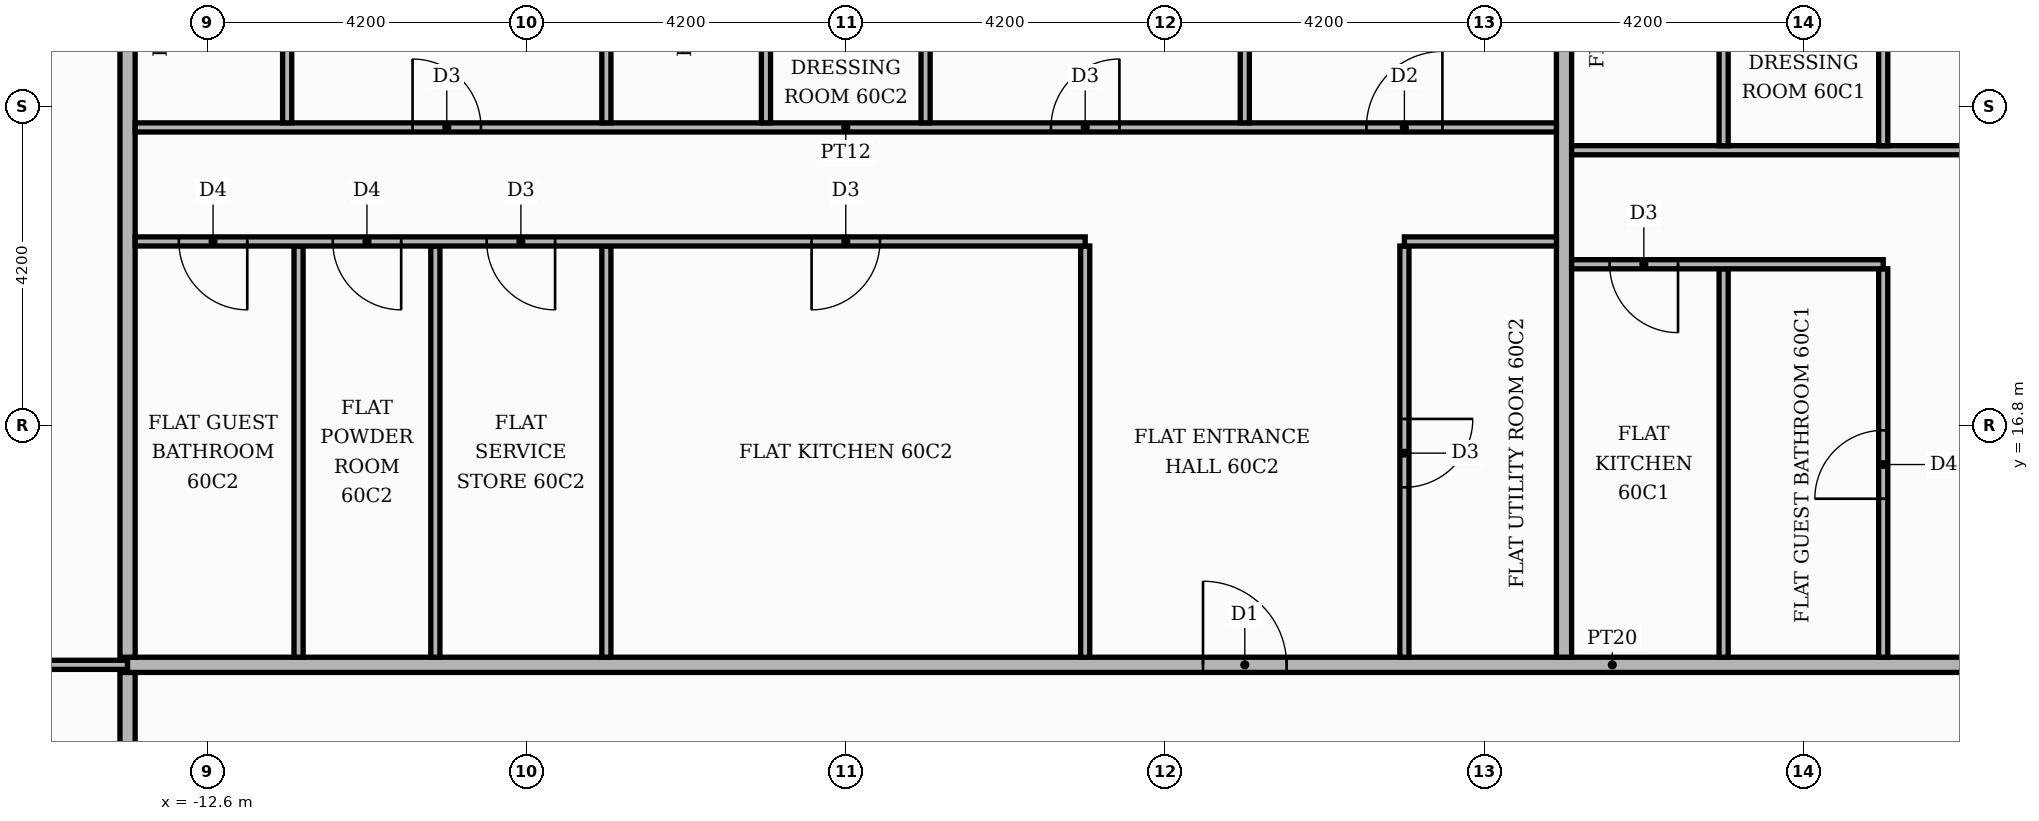
"""IFC4 building model, lengths in metres.
Left out: names, types, materials, properties, quantities, classifications, styles, units other than length and angle.
Written with IfcOpenShell. Run it as: python <this file> out.ifc"""

import sys

from ifc_helpers import new_model, si_unit, direction, frame, frame_2d, origin, place, context, subcontext, project, spatial, rectangle, extrude, element, fill, save


model = new_model("IFC4")
c1 = context("Model", 3, precision=1e-05, world=origin(), true_north=direction((0.0, 1.0)))
c2 = subcontext(c1, "Body", "Model", "MODEL_VIEW")
j1 = project(units=[si_unit("LENGTHUNIT", "METRE"), si_unit("PLANEANGLEUNIT", "RADIAN")], contexts=[c1])
p1 = place(None, origin())
s1 = spatial("IfcSite", under=j1, at=p1, CompositionType="ELEMENT")
p2 = place(p1, origin())
s2 = spatial("IfcBuilding", under=s1, at=p2, CompositionType="ELEMENT")
p3 = place(p2, frame((0.0, 0.0, 252.3)))
s3 = spatial("IfcBuildingStorey", under=s2, at=p3, CompositionType="ELEMENT", Elevation=252.3)
p4 = place(p3, frame((-13.65, 11.1, 0.0), z_axis=(0.0, 0.0, 1.0), x_axis=(0.0, 1.0, 0.0)))
e1 = element("IfcWall", 1, at=p4, inside=s3, PredefinedType="PARTITIONING", context=c2, shape_type="SweptSolid", body=[
    extrude(rectangle(XDim=2.45, YDim=0.2, at=frame_2d((1.225, 0.0))), origin(), (0.0, 0.0, 1.0), 3.48),
])
p5 = place(p3, frame((-20.12, 13.65, 0.0), z_axis=(0.0, 0.0, 1.0), x_axis=(1.0, 0.0, 0.0)))
e2 = element("IfcWall", 2, at=p5, inside=s3, PredefinedType="PARTITIONING", context=c2, shape_type="SweptSolid", body=[
    extrude(rectangle(XDim=6.47, YDim=0.12, at=frame_2d((3.235, 0.0))), origin(), (0.0, 0.0, 1.0), 3.48),
])
p6 = place(p5, frame((2.785, 0.0, 0.0)))
e3 = element("IfcOpeningElement", 3, at=p6, cuts=e2, PredefinedType="OPENING", context=c2, shape_type="SweptSolid", body=[
    extrude(rectangle(XDim=0.9, YDim=2.1, at=frame_2d((0.45, 1.05))), frame((0.0, 0.07, 0.0), z_axis=(0.0, -1.0, 0.0), x_axis=(1.0, 0.0, 0.0)), (0.0, 0.0, 1.0), 0.14),
])
p7 = place(p3, frame((-13.65, 13.65, 0.0), z_axis=(0.0, 0.0, 1.0), x_axis=(1.0, 0.0, 0.0)))
e4 = element("IfcWall", 4, at=p7, inside=s3, PredefinedType="PARTITIONING", context=c2, shape_type="SweptSolid", body=[
    extrude(rectangle(XDim=39.07, YDim=0.2, at=frame_2d((19.535, 0.0))), origin(), (0.0, 0.0, 1.0), 3.48),
])
p8 = place(p7, frame((24.65, 0.0, 0.0)))
e5 = element("IfcOpeningElement", 5, at=p8, cuts=e4, PredefinedType="OPENING", context=c2, shape_type="SweptSolid", body=[
    extrude(rectangle(XDim=1.1, YDim=2.4, at=frame_2d((0.55, 1.2))), frame((0.0, 0.11, 0.0), z_axis=(0.0, -1.0, 0.0), x_axis=(1.0, 0.0, 0.0)), (0.0, 0.0, 1.0), 0.22),
])
p9 = place(p7, frame((14.15, 0.0, 0.0)))
e6 = element("IfcOpeningElement", 6, at=p9, cuts=e4, PredefinedType="OPENING", context=c2, shape_type="SweptSolid", body=[
    extrude(rectangle(XDim=1.1, YDim=2.4, at=frame_2d((0.55, 1.2))), frame((0.0, 0.11, 0.0), z_axis=(0.0, -1.0, 0.0), x_axis=(1.0, 0.0, 0.0)), (0.0, 0.0, 1.0), 0.22),
])
p10 = place(p3, frame((-13.65, 13.75, 0.0), z_axis=(0.0, 0.0, 1.0), x_axis=(0.0, 1.0, 0.0)))
e7 = element("IfcWall", 7, at=p10, inside=s3, PredefinedType="PARTITIONING", context=c2, shape_type="SweptSolid", body=[
    extrude(rectangle(XDim=11.67, YDim=0.2, at=frame_2d((5.835, 0.0))), origin(), (0.0, 0.0, 1.0), 3.48),
])
for number, where, z_axis, x_axis in (
    (8, (-11.4, 13.75, 0.0), (0.0, 0.0, 1.0), (0.0, 1.0, 0.0)),
    (9, (-9.6, 13.75, 0.0), (0.0, 0.0, 1.0), (0.0, 1.0, 0.0)),
    (10, (-7.35, 13.75, 0.0), (0.0, 0.0, 1.0), (0.0, 1.0, 0.0)),
    (11, (-1.05, 13.75, 0.0), (0.0, 0.0, 1.0), (0.0, 1.0, 0.0)),
):
    element("IfcWall", number, at=place(p3, frame(where, z_axis=z_axis, x_axis=x_axis)), inside=s3, PredefinedType="PARTITIONING", context=c2, shape_type="SweptSolid", body=[
        extrude(rectangle(XDim=5.41, YDim=0.12, at=frame_2d((2.705, 0.0))), origin(), (0.0, 0.0, 1.0), 3.48),
    ])
p11 = place(p3, frame((3.15, 13.75, 0.0), z_axis=(0.0, 0.0, 1.0), x_axis=(0.0, 1.0, 0.0)))
e12 = element("IfcWall", 12, at=p11, inside=s3, PredefinedType="PARTITIONING", context=c2, shape_type="SweptSolid", body=[
    extrude(rectangle(XDim=5.41, YDim=0.12, at=frame_2d((2.705, 0.0))), origin(), (0.0, 0.0, 1.0), 3.48),
])
p12 = place(p11, frame((2.235, 0.0, 0.0)))
e13 = element("IfcOpeningElement", 13, at=p12, cuts=e12, PredefinedType="OPENING", context=c2, shape_type="SweptSolid", body=[
    extrude(rectangle(XDim=0.9, YDim=2.1, at=frame_2d((0.45, 1.05))), frame((0.0, 0.07, 0.0), z_axis=(0.0, -1.0, 0.0), x_axis=(1.0, 0.0, 0.0)), (0.0, 0.0, 1.0), 0.14),
])
p13 = place(p3, frame((5.25, 13.75, 0.0), z_axis=(0.0, 0.0, 1.0), x_axis=(0.0, 1.0, 0.0)))
e14 = element("IfcWall", 14, at=p13, inside=s3, PredefinedType="PARTITIONING", context=c2, shape_type="SweptSolid", body=[
    extrude(rectangle(XDim=11.67, YDim=0.2, at=frame_2d((5.835, 0.0))), origin(), (0.0, 0.0, 1.0), 3.48),
])
p14 = place(p3, frame((7.35, 13.75, 0.0), z_axis=(0.0, 0.0, 1.0), x_axis=(0.0, 1.0, 0.0)))
e15 = element("IfcWall", 15, at=p14, inside=s3, PredefinedType="PARTITIONING", context=c2, shape_type="SweptSolid", body=[
    extrude(rectangle(XDim=5.11, YDim=0.12, at=frame_2d((2.555, 0.0))), origin(), (0.0, 0.0, 1.0), 3.48),
])
p15 = place(p3, frame((9.45, 13.75, 0.0), z_axis=(0.0, 0.0, 1.0), x_axis=(0.0, 1.0, 0.0)))
e16 = element("IfcWall", 16, at=p15, inside=s3, PredefinedType="PARTITIONING", context=c2, shape_type="SweptSolid", body=[
    extrude(rectangle(XDim=5.11, YDim=0.12, at=frame_2d((2.555, 0.0))), origin(), (0.0, 0.0, 1.0), 3.48),
])
p16 = place(p15, frame((2.085, 0.0, 0.0)))
e17 = element("IfcOpeningElement", 17, at=p16, cuts=e16, PredefinedType="OPENING", context=c2, shape_type="SweptSolid", body=[
    extrude(rectangle(XDim=0.9, YDim=2.1, at=frame_2d((0.45, 1.05))), frame((0.0, 0.07, 0.0), z_axis=(0.0, -1.0, 0.0), x_axis=(1.0, 0.0, 0.0)), (0.0, 0.0, 1.0), 0.14),
])
p17 = place(p3, frame((5.35, 18.92, 0.0), z_axis=(0.0, 0.0, 1.0), x_axis=(1.0, 0.0, 0.0)))
e18 = element("IfcWall", 18, at=p17, inside=s3, PredefinedType="PARTITIONING", context=c2, shape_type="SweptSolid", body=[
    extrude(rectangle(XDim=4.1, YDim=0.12, at=frame_2d((2.05, 0.0))), origin(), (0.0, 0.0, 1.0), 3.48),
])
p18 = place(p17, frame((0.5, 0.0, 0.0)))
e19 = element("IfcOpeningElement", 19, at=p18, cuts=e18, PredefinedType="OPENING", context=c2, shape_type="SweptSolid", body=[
    extrude(rectangle(XDim=0.9, YDim=2.1, at=frame_2d((0.45, 1.05))), frame((0.0, 0.07, 0.0), z_axis=(0.0, -1.0, 0.0), x_axis=(1.0, 0.0, 0.0)), (0.0, 0.0, 1.0), 0.14),
])
p19 = place(p3, frame((-13.55, 19.22, 0.0), z_axis=(0.0, 0.0, 1.0), x_axis=(1.0, 0.0, 0.0)))
e20 = element("IfcWall", 20, at=p19, inside=s3, PredefinedType="PARTITIONING", context=c2, shape_type="SweptSolid", body=[
    extrude(rectangle(XDim=12.5, YDim=0.12, at=frame_2d((6.25, 0.0))), origin(), (0.0, 0.0, 1.0), 3.48),
])
p20 = place(p19, frame((8.9, 0.0, 0.0)))
e21 = element("IfcOpeningElement", 21, at=p20, cuts=e20, PredefinedType="OPENING", context=c2, shape_type="SweptSolid", body=[
    extrude(rectangle(XDim=0.9, YDim=2.1, at=frame_2d((0.45, 1.05))), frame((0.0, 0.07, 0.0), z_axis=(0.0, -1.0, 0.0), x_axis=(1.0, 0.0, 0.0)), (0.0, 0.0, 1.0), 0.14),
])
p21 = place(p19, frame((4.625, 0.0, 0.0)))
e22 = element("IfcOpeningElement", 22, at=p21, cuts=e20, PredefinedType="OPENING", context=c2, shape_type="SweptSolid", body=[
    extrude(rectangle(XDim=0.9, YDim=2.1, at=frame_2d((0.45, 1.05))), frame((0.0, 0.07, 0.0), z_axis=(0.0, -1.0, 0.0), x_axis=(1.0, 0.0, 0.0)), (0.0, 0.0, 1.0), 0.14),
])
p22 = place(p19, frame((2.6, 0.0, 0.0)))
e23 = element("IfcOpeningElement", 23, at=p22, cuts=e20, PredefinedType="OPENING", context=c2, shape_type="SweptSolid", body=[
    extrude(rectangle(XDim=0.9, YDim=2.1, at=frame_2d((0.45, 1.05))), frame((0.0, 0.07, 0.0), z_axis=(0.0, -1.0, 0.0), x_axis=(1.0, 0.0, 0.0)), (0.0, 0.0, 1.0), 0.14),
])
p23 = place(p19, frame((0.575, 0.0, 0.0)))
e24 = element("IfcOpeningElement", 24, at=p23, cuts=e20, PredefinedType="OPENING", context=c2, shape_type="SweptSolid", body=[
    extrude(rectangle(XDim=0.9, YDim=2.1, at=frame_2d((0.45, 1.05))), frame((0.0, 0.07, 0.0), z_axis=(0.0, -1.0, 0.0), x_axis=(1.0, 0.0, 0.0)), (0.0, 0.0, 1.0), 0.14),
])
p24 = place(p3, frame((3.15, 19.22, 0.0), z_axis=(0.0, 0.0, 1.0), x_axis=(1.0, 0.0, 0.0)))
e25 = element("IfcWall", 25, at=p24, inside=s3, PredefinedType="PARTITIONING", context=c2, shape_type="SweptSolid", body=[
    extrude(rectangle(XDim=2.0, YDim=0.12, at=frame_2d((1.0, 0.0))), origin(), (0.0, 0.0, 1.0), 3.48),
])
p25 = place(p3, frame((5.35, 20.42, 0.0), z_axis=(0.0, 0.0, 1.0), x_axis=(1.0, 0.0, 0.0)))
e26 = element("IfcWall", 26, at=p25, inside=s3, PredefinedType="PARTITIONING", context=c2, shape_type="SweptSolid", body=[
    extrude(rectangle(XDim=15.369, YDim=0.12, at=frame_2d((7.685, 0.0))), origin(), (0.0, 0.0, 1.0), 3.48),
])
p26 = place(p25, frame((8.85, 0.0, 0.0)))
e27 = element("IfcOpeningElement", 27, at=p26, cuts=e26, PredefinedType="OPENING", context=c2, shape_type="SweptSolid", body=[
    extrude(rectangle(XDim=1.0, YDim=2.1, at=frame_2d((0.5, 1.05))), frame((0.0, 0.07, 0.0), z_axis=(0.0, -1.0, 0.0), x_axis=(1.0, 0.0, 0.0)), (0.0, 0.0, 1.0), 0.14),
])
p27 = place(p25, frame((5.75, 0.0, 0.0)))
e28 = element("IfcOpeningElement", 28, at=p27, cuts=e26, PredefinedType="OPENING", context=c2, shape_type="SweptSolid", body=[
    extrude(rectangle(XDim=0.9, YDim=2.1, at=frame_2d((0.45, 1.05))), frame((0.0, 0.07, 0.0), z_axis=(0.0, -1.0, 0.0), x_axis=(1.0, 0.0, 0.0)), (0.0, 0.0, 1.0), 0.14),
])
p28 = place(p3, frame((7.35, 20.48, 0.0), z_axis=(0.0, 0.0, 1.0), x_axis=(0.0, 1.0, 0.0)))
e29 = element("IfcWall", 29, at=p28, inside=s3, PredefinedType="PARTITIONING", context=c2, shape_type="SweptSolid", body=[
    extrude(rectangle(XDim=4.94, YDim=0.12, at=frame_2d((2.47, 0.0))), origin(), (0.0, 0.0, 1.0), 3.48),
])
p29 = place(p28, frame((2.14, 0.0, 0.0)))
e30 = element("IfcOpeningElement", 30, at=p29, cuts=e29, PredefinedType="OPENING", context=c2, shape_type="SweptSolid", body=[
    extrude(rectangle(XDim=0.9, YDim=2.1, at=frame_2d((0.45, 1.05))), frame((0.0, 0.07, 0.0), z_axis=(0.0, -1.0, 0.0), x_axis=(1.0, 0.0, 0.0)), (0.0, 0.0, 1.0), 0.14),
])
p30 = place(p3, frame((9.45, 20.48, 0.0), z_axis=(0.0, 0.0, 1.0), x_axis=(0.0, 1.0, 0.0)))
e31 = element("IfcWall", 31, at=p30, inside=s3, PredefinedType="PARTITIONING", context=c2, shape_type="SweptSolid", body=[
    extrude(rectangle(XDim=4.94, YDim=0.12, at=frame_2d((2.47, 0.0))), origin(), (0.0, 0.0, 1.0), 3.48),
])
p31 = place(p30, frame((2.14, 0.0, 0.0)))
e32 = element("IfcOpeningElement", 32, at=p31, cuts=e31, PredefinedType="OPENING", context=c2, shape_type="SweptSolid", body=[
    extrude(rectangle(XDim=0.9, YDim=2.1, at=frame_2d((0.45, 1.05))), frame((0.0, 0.07, 0.0), z_axis=(0.0, -1.0, 0.0), x_axis=(1.0, 0.0, 0.0)), (0.0, 0.0, 1.0), 0.14),
])
p32 = place(p3, frame((-13.55, 20.72, 0.0), z_axis=(0.0, 0.0, 1.0), x_axis=(1.0, 0.0, 0.0)))
e33 = element("IfcWall", 33, at=p32, inside=s3, PredefinedType="PARTITIONING", context=c2, shape_type="SweptSolid", body=[
    extrude(rectangle(XDim=18.7, YDim=0.12, at=frame_2d((9.35, 0.0))), origin(), (0.0, 0.0, 1.0), 3.48),
])
p33 = place(p32, frame((16.2, 0.0, 0.0)))
e34 = element("IfcOpeningElement", 34, at=p33, cuts=e33, PredefinedType="OPENING", context=c2, shape_type="SweptSolid", body=[
    extrude(rectangle(XDim=1.0, YDim=2.1, at=frame_2d((0.5, 1.05))), frame((0.0, 0.07, 0.0), z_axis=(0.0, -1.0, 0.0), x_axis=(1.0, 0.0, 0.0)), (0.0, 0.0, 1.0), 0.14),
])
p34 = place(p32, frame((12.05, 0.0, 0.0)))
e35 = element("IfcOpeningElement", 35, at=p34, cuts=e33, PredefinedType="OPENING", context=c2, shape_type="SweptSolid", body=[
    extrude(rectangle(XDim=0.9, YDim=2.1, at=frame_2d((0.45, 1.05))), frame((0.0, 0.07, 0.0), z_axis=(0.0, -1.0, 0.0), x_axis=(1.0, 0.0, 0.0)), (0.0, 0.0, 1.0), 0.14),
])
p35 = place(p32, frame((3.65, 0.0, 0.0)))
e36 = element("IfcOpeningElement", 36, at=p35, cuts=e33, PredefinedType="OPENING", context=c2, shape_type="SweptSolid", body=[
    extrude(rectangle(XDim=0.9, YDim=2.1, at=frame_2d((0.45, 1.05))), frame((0.0, 0.07, 0.0), z_axis=(0.0, -1.0, 0.0), x_axis=(1.0, 0.0, 0.0)), (0.0, 0.0, 1.0), 0.14),
])
p36 = place(p3, frame((-11.55, 20.78, 0.0), z_axis=(0.0, 0.0, 1.0), x_axis=(0.0, 1.0, 0.0)))
e37 = element("IfcWall", 37, at=p36, inside=s3, PredefinedType="PARTITIONING", context=c2, shape_type="SweptSolid", body=[
    extrude(rectangle(XDim=4.64, YDim=0.12, at=frame_2d((2.32, 0.0))), origin(), (0.0, 0.0, 1.0), 3.48),
])
p37 = place(p36, frame((1.99, 0.0, 0.0)))
e38 = element("IfcOpeningElement", 38, at=p37, cuts=e37, PredefinedType="OPENING", context=c2, shape_type="SweptSolid", body=[
    extrude(rectangle(XDim=0.9, YDim=2.1, at=frame_2d((0.45, 1.05))), frame((0.0, 0.07, 0.0), z_axis=(0.0, -1.0, 0.0), x_axis=(1.0, 0.0, 0.0)), (0.0, 0.0, 1.0), 0.14),
])
p38 = place(p3, frame((-7.35, 20.78, 0.0), z_axis=(0.0, 0.0, 1.0), x_axis=(0.0, 1.0, 0.0)))
e39 = element("IfcWall", 39, at=p38, inside=s3, PredefinedType="PARTITIONING", context=c2, shape_type="SweptSolid", body=[
    extrude(rectangle(XDim=4.64, YDim=0.12, at=frame_2d((2.32, 0.0))), origin(), (0.0, 0.0, 1.0), 3.48),
])
p39 = place(p3, frame((-5.25, 20.78, 0.0), z_axis=(0.0, 0.0, 1.0), x_axis=(0.0, 1.0, 0.0)))
e40 = element("IfcWall", 40, at=p39, inside=s3, PredefinedType="PARTITIONING", context=c2, shape_type="SweptSolid", body=[
    extrude(rectangle(XDim=4.64, YDim=0.12, at=frame_2d((2.32, 0.0))), origin(), (0.0, 0.0, 1.0), 3.48),
])
p40 = place(p39, frame((1.99, 0.0, 0.0)))
e41 = element("IfcOpeningElement", 41, at=p40, cuts=e40, PredefinedType="OPENING", context=c2, shape_type="SweptSolid", body=[
    extrude(rectangle(XDim=0.9, YDim=2.1, at=frame_2d((0.45, 1.05))), frame((0.0, 0.07, 0.0), z_axis=(0.0, -1.0, 0.0), x_axis=(1.0, 0.0, 0.0)), (0.0, 0.0, 1.0), 0.14),
])
p41 = place(p3, frame((-3.15, 20.78, 0.0), z_axis=(0.0, 0.0, 1.0), x_axis=(0.0, 1.0, 0.0)))
e42 = element("IfcWall", 42, at=p41, inside=s3, PredefinedType="PARTITIONING", context=c2, shape_type="SweptSolid", body=[
    extrude(rectangle(XDim=4.64, YDim=0.12, at=frame_2d((2.32, 0.0))), origin(), (0.0, 0.0, 1.0), 3.48),
])
p42 = place(p41, frame((1.99, 0.0, 0.0)))
e43 = element("IfcOpeningElement", 43, at=p42, cuts=e42, PredefinedType="OPENING", context=c2, shape_type="SweptSolid", body=[
    extrude(rectangle(XDim=0.9, YDim=2.1, at=frame_2d((0.45, 1.05))), frame((0.0, 0.07, 0.0), z_axis=(0.0, -1.0, 0.0), x_axis=(1.0, 0.0, 0.0)), (0.0, 0.0, 1.0), 0.14),
])
p43 = place(p3, frame((1.05, 20.78, 0.0), z_axis=(0.0, 0.0, 1.0), x_axis=(0.0, 1.0, 0.0)))
e44 = element("IfcWall", 44, at=p43, inside=s3, PredefinedType="PARTITIONING", context=c2, shape_type="SweptSolid", body=[
    extrude(rectangle(XDim=4.64, YDim=0.12, at=frame_2d((2.32, 0.0))), origin(), (0.0, 0.0, 1.0), 3.48),
])
p44 = place(p16, origin())
e45 = element("IfcDoor", 45, at=p44, inside=s3, OperationType="SINGLE_SWING_LEFT", PredefinedType="DOOR", context=c2, shape_type="SweptSolid", body=[
    extrude(rectangle(XDim=0.9, YDim=2.1, at=frame_2d((0.45, 1.05))), frame((0.0, 0.025, 0.0), z_axis=(0.0, -1.0, 0.0), x_axis=(1.0, 0.0, 0.0)), (0.0, 0.0, 1.0), 0.05),
])
fill(e17, e45)
p45 = place(p18, frame((0.9, 0.0, 0.0), z_axis=(0.0, 0.0, 1.0), x_axis=(-1.0, 0.0, 0.0)))
e46 = element("IfcDoor", 46, at=p45, inside=s3, OperationType="SINGLE_SWING_RIGHT", PredefinedType="DOOR", context=c2, shape_type="SweptSolid", body=[
    extrude(rectangle(XDim=0.9, YDim=2.1, at=frame_2d((0.45, 1.05))), frame((0.0, 0.025, 0.0), z_axis=(0.0, -1.0, 0.0), x_axis=(1.0, 0.0, 0.0)), (0.0, 0.0, 1.0), 0.05),
])
fill(e19, e46)
p46 = place(p9, origin())
e47 = element("IfcDoor", 47, at=p46, inside=s3, OperationType="SINGLE_SWING_LEFT", PredefinedType="DOOR", context=c2, shape_type="SweptSolid", body=[
    extrude(rectangle(XDim=1.1, YDim=2.4, at=frame_2d((0.55, 1.2))), frame((0.0, 0.025, 0.0), z_axis=(0.0, -1.0, 0.0), x_axis=(1.0, 0.0, 0.0)), (0.0, 0.0, 1.0), 0.05),
])
fill(e6, e47)
p47 = place(p12, frame((0.9, 0.0, 0.0), z_axis=(0.0, 0.0, 1.0), x_axis=(-1.0, 0.0, 0.0)))
e48 = element("IfcDoor", 48, at=p47, inside=s3, OperationType="SINGLE_SWING_RIGHT", PredefinedType="DOOR", context=c2, shape_type="SweptSolid", body=[
    extrude(rectangle(XDim=0.9, YDim=2.1, at=frame_2d((0.45, 1.05))), frame((0.0, 0.025, 0.0), z_axis=(0.0, -1.0, 0.0), x_axis=(1.0, 0.0, 0.0)), (0.0, 0.0, 1.0), 0.05),
])
fill(e13, e48)
p48 = place(p20, frame((0.9, 0.0, 0.0), z_axis=(0.0, 0.0, 1.0), x_axis=(-1.0, 0.0, 0.0)))
e49 = element("IfcDoor", 49, at=p48, inside=s3, OperationType="SINGLE_SWING_LEFT", PredefinedType="DOOR", context=c2, shape_type="SweptSolid", body=[
    extrude(rectangle(XDim=0.9, YDim=2.1, at=frame_2d((0.45, 1.05))), frame((0.0, 0.025, 0.0), z_axis=(0.0, -1.0, 0.0), x_axis=(1.0, 0.0, 0.0)), (0.0, 0.0, 1.0), 0.05),
])
fill(e21, e49)
p49 = place(p21, frame((0.9, 0.0, 0.0), z_axis=(0.0, 0.0, 1.0), x_axis=(-1.0, 0.0, 0.0)))
e50 = element("IfcDoor", 50, at=p49, inside=s3, OperationType="SINGLE_SWING_RIGHT", PredefinedType="DOOR", context=c2, shape_type="SweptSolid", body=[
    extrude(rectangle(XDim=0.9, YDim=2.1, at=frame_2d((0.45, 1.05))), frame((0.0, 0.025, 0.0), z_axis=(0.0, -1.0, 0.0), x_axis=(1.0, 0.0, 0.0)), (0.0, 0.0, 1.0), 0.05),
])
fill(e22, e50)
p50 = place(p22, frame((0.9, 0.0, 0.0), z_axis=(0.0, 0.0, 1.0), x_axis=(-1.0, 0.0, 0.0)))
e51 = element("IfcDoor", 51, at=p50, inside=s3, OperationType="SINGLE_SWING_RIGHT", PredefinedType="DOOR", context=c2, shape_type="SweptSolid", body=[
    extrude(rectangle(XDim=0.9, YDim=2.1, at=frame_2d((0.45, 1.05))), frame((0.0, 0.025, 0.0), z_axis=(0.0, -1.0, 0.0), x_axis=(1.0, 0.0, 0.0)), (0.0, 0.0, 1.0), 0.05),
])
fill(e23, e51)
p51 = place(p23, frame((0.9, 0.0, 0.0), z_axis=(0.0, 0.0, 1.0), x_axis=(-1.0, 0.0, 0.0)))
e52 = element("IfcDoor", 52, at=p51, inside=s3, OperationType="SINGLE_SWING_RIGHT", PredefinedType="DOOR", context=c2, shape_type="SweptSolid", body=[
    extrude(rectangle(XDim=0.9, YDim=2.1, at=frame_2d((0.45, 1.05))), frame((0.0, 0.025, 0.0), z_axis=(0.0, -1.0, 0.0), x_axis=(1.0, 0.0, 0.0)), (0.0, 0.0, 1.0), 0.05),
])
fill(e24, e52)
p52 = place(p33, origin())
e53 = element("IfcDoor", 53, at=p52, inside=s3, OperationType="SINGLE_SWING_RIGHT", PredefinedType="DOOR", context=c2, shape_type="SweptSolid", body=[
    extrude(rectangle(XDim=1.0, YDim=2.1, at=frame_2d((0.5, 1.05))), frame((0.0, 0.025, 0.0), z_axis=(0.0, -1.0, 0.0), x_axis=(1.0, 0.0, 0.0)), (0.0, 0.0, 1.0), 0.05),
])
fill(e34, e53)
p53 = place(p34, origin())
e54 = element("IfcDoor", 54, at=p53, inside=s3, OperationType="SINGLE_SWING_RIGHT", PredefinedType="DOOR", context=c2, shape_type="SweptSolid", body=[
    extrude(rectangle(XDim=0.9, YDim=2.1, at=frame_2d((0.45, 1.05))), frame((0.0, 0.025, 0.0), z_axis=(0.0, -1.0, 0.0), x_axis=(1.0, 0.0, 0.0)), (0.0, 0.0, 1.0), 0.05),
])
fill(e35, e54)
p54 = place(p35, origin())
e55 = element("IfcDoor", 55, at=p54, inside=s3, OperationType="SINGLE_SWING_LEFT", PredefinedType="DOOR", context=c2, shape_type="SweptSolid", body=[
    extrude(rectangle(XDim=0.9, YDim=2.1, at=frame_2d((0.45, 1.05))), frame((0.0, 0.025, 0.0), z_axis=(0.0, -1.0, 0.0), x_axis=(1.0, 0.0, 0.0)), (0.0, 0.0, 1.0), 0.05),
])
fill(e36, e55)
save(model, sys.argv[1])
